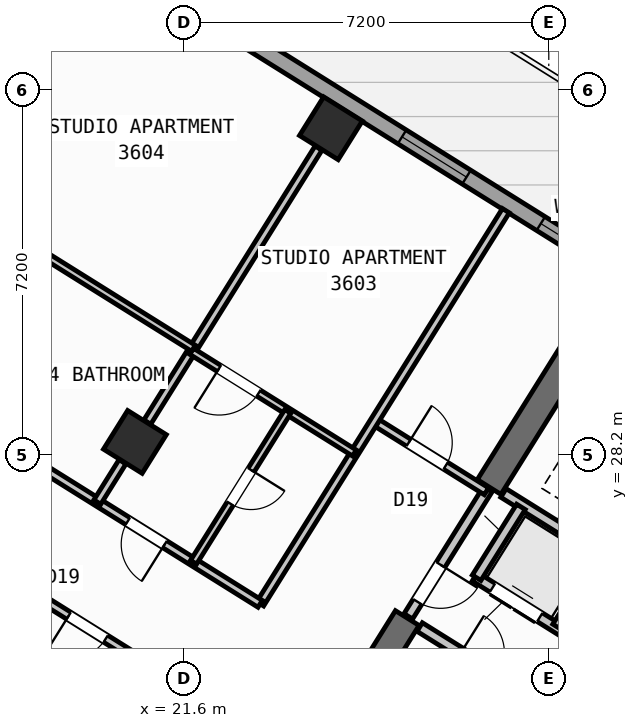
"""IFC4 building model, lengths in metres.
Left out: names, types, materials, properties, quantities, classifications, styles, units other than length and angle.
Written with IfcOpenShell. Run it as: python <this file> out.ifc"""

import sys

from ifc_helpers import new_model, si_unit, direction, frame, frame_2d, origin, origin_2d, place, context, subcontext, project, spatial, rectangle, hollow_rectangle, extrude, source, transform, mapped, element, fill, save


model = new_model("IFC4")
c1 = context("Model", 3, precision=1e-05, world=origin(), true_north=direction((0.0, 1.0)))
c2 = subcontext(c1, "Body", "Model", "MODEL_VIEW")
j1 = project(units=[si_unit("LENGTHUNIT", "METRE"), si_unit("PLANEANGLEUNIT", "RADIAN")], contexts=[c1])
p1 = place(None, origin())
s1 = spatial("IfcSite", under=j1, at=p1, CompositionType="ELEMENT")
p2 = place(p1, origin())
s2 = spatial("IfcBuilding", under=s1, at=p2, CompositionType="ELEMENT")
p3 = place(p2, frame((0.0, 0.0, 144.3)))
s3 = spatial("IfcBuildingStorey", under=s2, at=p3, CompositionType="ELEMENT", Elevation=144.3)
p4 = place(p3, frame((29.517, 30.594, 0.0), z_axis=(0.0, 0.0, 1.0), x_axis=(-0.529906864564, -0.848055844204, 0.0)))
e1 = element("IfcWall", 1, at=p4, inside=s3, PredefinedType="SHEAR", context=c2, shape_type="SweptSolid", body=[
    extrude(rectangle(XDim=3.575, YDim=0.55, at=frame_2d((1.788, 0.0))), origin(), (0.0, 0.0, 1.0), 3.35),
])
p5 = place(p3, frame((26.007, 24.976, 0.0), z_axis=(0.0, 0.0, 1.0), x_axis=(-0.529923795287, -0.848045264823, 0.0)))
e2 = element("IfcWall", 2, at=p5, inside=s3, PredefinedType="SHEAR", context=c2, shape_type="SweptSolid", body=[
    extrude(rectangle(XDim=6.425, YDim=0.55, at=frame_2d((3.212, 0.0))), origin(), (0.0, 0.0, 1.0), 3.35),
])
m1 = source(origin(), c2, "Body", "SweptSolid", [
    extrude(hollow_rectangle(XDim=0.9, YDim=0.9, WallThickness=0.036, at=origin_2d()), origin(), (0.0, 0.0, 1.0), 3.6),
])
for number, where, z_axis, x_axis in (
    (3, (24.5, 34.643, 0.0), (0.0, 0.0, 1.0), (-0.848, 0.53, 0.0)),
    (4, (20.632, 28.452, 0.0), (0.0, 0.0, 1.0), (-0.848, 0.53, 0.0)),
):
    element("IfcColumn", number, at=place(p3, frame(where, z_axis=z_axis, x_axis=x_axis)), inside=s3, PredefinedType="COLUMN", context=c2, shape_type="MappedRepresentation", body=[
        mapped(m1, transform((0.0, 0.0, 0.0), scale=1.0)),
    ])
p6 = place(p3, frame((14.138, 41.825, 0.0), z_axis=(0.0, 0.0, 1.0), x_axis=(0.848046498049, -0.529921821731, 0.0)))
e5 = element("IfcWall", 5, at=p6, inside=s3, PredefinedType="STANDARD", context=c2, shape_type="SweptSolid", body=[
    extrude(rectangle(XDim=31.588, YDim=0.32, at=frame_2d((15.794, 0.0))), origin(), (0.0, 0.0, 1.0), 3.35),
])
p7 = place(p6, frame((2.949, 0.0, 0.0)))
e6 = element("IfcOpeningElement", 6, at=p7, cuts=e5, PredefinedType="OPENING", context=c2, shape_type="SweptSolid", body=[
    extrude(rectangle(XDim=1.05, YDim=2.15, at=frame_2d((0.525, 1.075))), frame((0.0, 0.17, 0.0), z_axis=(0.0, -1.0, 0.0), x_axis=(1.0, 0.0, 0.0)), (0.0, 0.0, 1.0), 0.34),
])
p8 = place(p6, frame((0.861, 0.0, 0.85)))
e7 = element("IfcOpeningElement", 7, at=p8, cuts=e5, PredefinedType="OPENING", context=c2, shape_type="SweptSolid", body=[
    extrude(rectangle(XDim=1.5, YDim=1.5, at=frame_2d((0.75, 0.75))), frame((0.0, 0.17, 0.0), z_axis=(0.0, -1.0, 0.0), x_axis=(1.0, 0.0, 0.0)), (0.0, 0.0, 1.0), 0.34),
])
p9 = place(p6, frame((8.494, 0.0, 0.85)))
e8 = element("IfcOpeningElement", 8, at=p9, cuts=e5, PredefinedType="OPENING", context=c2, shape_type="SweptSolid", body=[
    extrude(rectangle(XDim=1.8, YDim=1.5, at=frame_2d((0.9, 0.75))), frame((0.0, 0.17, 0.0), z_axis=(0.0, -1.0, 0.0), x_axis=(1.0, 0.0, 0.0)), (0.0, 0.0, 1.0), 0.34),
])
p10 = place(p6, frame((13.874, 0.0, 0.85)))
e9 = element("IfcOpeningElement", 9, at=p10, cuts=e5, PredefinedType="OPENING", context=c2, shape_type="SweptSolid", body=[
    extrude(rectangle(XDim=1.5, YDim=1.5, at=frame_2d((0.75, 0.75))), frame((0.0, 0.17, 0.0), z_axis=(0.0, -1.0, 0.0), x_axis=(1.0, 0.0, 0.0)), (0.0, 0.0, 1.0), 0.34),
])
p11 = place(p6, frame((17.104, 0.0, 1.0)))
e10 = element("IfcOpeningElement", 10, at=p11, cuts=e5, PredefinedType="OPENING", context=c2, shape_type="SweptSolid", body=[
    extrude(rectangle(XDim=0.9, YDim=1.25, at=frame_2d((0.45, 0.625))), frame((0.0, 0.17, 0.0), z_axis=(0.0, -1.0, 0.0), x_axis=(1.0, 0.0, 0.0)), (0.0, 0.0, 1.0), 0.34),
])
p12 = place(p6, frame((22.144, 0.0, 1.0)))
e11 = element("IfcOpeningElement", 11, at=p12, cuts=e5, PredefinedType="OPENING", context=c2, shape_type="SweptSolid", body=[
    extrude(rectangle(XDim=0.9, YDim=1.25, at=frame_2d((0.45, 0.625))), frame((0.0, 0.17, 0.0), z_axis=(0.0, -1.0, 0.0), x_axis=(1.0, 0.0, 0.0)), (0.0, 0.0, 1.0), 0.34),
])
p13 = place(p6, frame((27.744, 0.0, 1.0)))
e12 = element("IfcOpeningElement", 12, at=p13, cuts=e5, PredefinedType="OPENING", context=c2, shape_type="SweptSolid", body=[
    extrude(rectangle(XDim=0.9, YDim=1.25, at=frame_2d((0.45, 0.625))), frame((0.0, 0.17, 0.0), z_axis=(0.0, -1.0, 0.0), x_axis=(1.0, 0.0, 0.0)), (0.0, 0.0, 1.0), 0.34),
])
p14 = place(p3, frame((31.822, 24.998, 0.0), z_axis=(0.0, 0.0, 1.0), x_axis=(-0.848036912365, 0.52993716162, 0.0)))
e13 = element("IfcWall", 13, at=p14, inside=s3, PredefinedType="STANDARD", context=c2, shape_type="SweptSolid", body=[
    extrude(rectangle(XDim=4.618, YDim=0.2, at=frame_2d((2.309, 0.0))), origin(), (0.0, 0.0, 1.0), 3.34),
])
p15 = place(p3, frame((32.108, 22.814, 0.0), z_axis=(0.0, 0.0, 1.0), x_axis=(-0.848042229521, 0.529928652696, 0.0)))
e14 = element("IfcWall", 14, at=p15, inside=s3, PredefinedType="STANDARD", context=c2, shape_type="SweptSolid", body=[
    extrude(rectangle(XDim=5.62, YDim=0.2, at=frame_2d((2.81, 0.0))), origin(), (0.0, 0.0, 1.0), 3.34),
])
p16 = place(p15, frame((0.39, 0.0, 0.0)))
e15 = element("IfcOpeningElement", 15, at=p16, cuts=e14, PredefinedType="OPENING", context=c2, shape_type="SweptSolid", body=[
    extrude(rectangle(XDim=1.1, YDim=2.15, at=frame_2d((0.55, 1.075))), frame((0.0, 0.11, 0.0), z_axis=(0.0, -1.0, 0.0), x_axis=(1.0, 0.0, 0.0)), (0.0, 0.0, 1.0), 0.22),
])
p17 = place(p15, frame((2.25, 0.0, 0.0)))
e16 = element("IfcOpeningElement", 16, at=p17, cuts=e14, PredefinedType="OPENING", context=c2, shape_type="SweptSolid", body=[
    extrude(rectangle(XDim=1.1, YDim=2.15, at=frame_2d((0.55, 1.075))), frame((0.0, 0.11, 0.0), z_axis=(0.0, -1.0, 0.0), x_axis=(1.0, 0.0, 0.0)), (0.0, 0.0, 1.0), 0.22),
])
p18 = place(p15, frame((4.11, 0.0, 0.0)))
e17 = element("IfcOpeningElement", 17, at=p18, cuts=e14, PredefinedType="OPENING", context=c2, shape_type="SweptSolid", body=[
    extrude(rectangle(XDim=1.1, YDim=2.15, at=frame_2d((0.55, 1.075))), frame((0.0, 0.11, 0.0), z_axis=(0.0, -1.0, 0.0), x_axis=(1.0, 0.0, 0.0)), (0.0, 0.0, 1.0), 0.22),
])
p19 = place(p3, frame((28.25, 27.17, 0.0), z_axis=(0.0, 0.0, 1.0), x_axis=(-0.529905827651, -0.848056492117, 0.0)))
e18 = element("IfcWall", 18, at=p19, inside=s3, PredefinedType="STANDARD", context=c2, shape_type="SweptSolid", body=[
    extrude(rectangle(XDim=1.65, YDim=0.2, at=frame_2d((0.825, 0.0))), origin(), (0.0, 0.0, 1.0), 3.34),
])
p20 = place(p3, frame((29.801, 26.142, 0.0), z_axis=(0.0, 0.0, 1.0), x_axis=(-0.529998940003, -0.847998304005, 0.0)))
e19 = element("IfcWall", 19, at=p20, inside=s3, PredefinedType="STANDARD", context=c2, shape_type="SweptSolid", body=[
    extrude(rectangle(XDim=1.58, YDim=0.2, at=frame_2d((0.79, 0.0))), origin(), (0.0, 0.0, 1.0), 3.34),
])
p21 = place(p3, frame((31.525, 21.504, 0.0), z_axis=(0.0, 0.0, 1.0), x_axis=(-0.848040211232, 0.529931882541, 0.0)))
e20 = element("IfcWall", 20, at=p21, inside=s3, PredefinedType="STANDARD", context=c2, shape_type="SweptSolid", body=[
    extrude(rectangle(XDim=6.218, YDim=0.2, at=frame_2d((3.109, 0.0))), origin(), (0.0, 0.0, 1.0), 3.34),
])
p22 = place(p21, frame((4.4, 0.0, 0.0)))
e21 = element("IfcOpeningElement", 21, at=p22, cuts=e20, PredefinedType="OPENING", context=c2, shape_type="SweptSolid", body=[
    extrude(rectangle(XDim=0.86, YDim=2.05, at=frame_2d((0.43, 1.025))), frame((0.0, 0.11, 0.0), z_axis=(0.0, -1.0, 0.0), x_axis=(1.0, 0.0, 0.0)), (0.0, 0.0, 1.0), 0.22),
])
p23 = place(p21, frame((1.45, 0.0, 0.0)))
e22 = element("IfcOpeningElement", 22, at=p23, cuts=e20, PredefinedType="OPENING", context=c2, shape_type="SweptSolid", body=[
    extrude(rectangle(XDim=0.86, YDim=2.05, at=frame_2d((0.43, 1.025))), frame((0.0, 0.11, 0.0), z_axis=(0.0, -1.0, 0.0), x_axis=(1.0, 0.0, 0.0)), (0.0, 0.0, 1.0), 0.22),
])
p24 = place(p3, frame((27.596, 27.52, 0.0), z_axis=(0.0, 0.0, 1.0), x_axis=(-0.529865479138, -0.848081702443, 0.0)))
e23 = element("IfcWall", 23, at=p24, inside=s3, PredefinedType="STANDARD", context=c2, shape_type="SweptSolid", body=[
    extrude(rectangle(XDim=2.96, YDim=0.2, at=frame_2d((1.48, 0.0))), origin(), (0.0, 0.0, 1.0), 3.34),
])
p25 = place(p24, frame((1.76, 0.0, 0.0)))
e24 = element("IfcOpeningElement", 24, at=p25, cuts=e23, PredefinedType="OPENING", context=c2, shape_type="SweptSolid", body=[
    extrude(rectangle(XDim=0.86, YDim=2.05, at=frame_2d((0.43, 1.025))), frame((0.0, 0.11, 0.0), z_axis=(0.0, -1.0, 0.0), x_axis=(1.0, 0.0, 0.0)), (0.0, 0.0, 1.0), 0.22),
])
p26 = place(p3, frame((27.57, 27.478, 0.0), z_axis=(0.0, 0.0, 1.0), x_axis=(-0.848050851465, 0.529914854792, 0.0)))
e25 = element("IfcWall", 25, at=p26, inside=s3, PredefinedType="PARTITIONING", context=c2, shape_type="SweptSolid", body=[
    extrude(rectangle(XDim=2.61, YDim=0.16, at=frame_2d((1.305, 0.0))), origin(), (0.0, 0.0, 1.0), 3.34),
])
p27 = place(p26, frame((0.95, 0.0, 0.0)))
e26 = element("IfcOpeningElement", 26, at=p27, cuts=e25, PredefinedType="OPENING", context=c2, shape_type="SweptSolid", body=[
    extrude(rectangle(XDim=0.86, YDim=2.05, at=frame_2d((0.43, 1.025))), frame((0.0, 0.09, 0.0), z_axis=(0.0, -1.0, 0.0), x_axis=(1.0, 0.0, 0.0)), (0.0, 0.0, 1.0), 0.18),
])
p28 = place(p3, frame((27.953, 33.016, 0.0), z_axis=(0.0, 0.0, 1.0), x_axis=(-0.529903001606, -0.848058257957, 0.0)))
e27 = element("IfcWall", 27, at=p28, inside=s3, PredefinedType="PARTITIONING", context=c2, shape_type="SweptSolid", body=[
    extrude(rectangle(XDim=9.15, YDim=0.16, at=frame_2d((4.575, 0.0))), origin(), (0.0, 0.0, 1.0), 3.34),
])
p29 = place(p3, frame((23.104, 25.256, 0.0), z_axis=(0.0, 0.0, 1.0), x_axis=(-0.848041752158, 0.529929416617, 0.0)))
e28 = element("IfcWall", 28, at=p29, inside=s3, PredefinedType="PARTITIONING", context=c2, shape_type="SweptSolid", body=[
    extrude(rectangle(XDim=16.73, YDim=0.16, at=frame_2d((8.365, 0.0))), origin(), (0.0, 0.0, 1.0), 3.34),
])
p30 = place(p29, frame((2.22, 0.0, 0.0)))
e29 = element("IfcOpeningElement", 29, at=p30, cuts=e28, PredefinedType="OPENING", context=c2, shape_type="SweptSolid", body=[
    extrude(rectangle(XDim=0.86, YDim=2.05, at=frame_2d((0.43, 1.025))), frame((0.0, 0.09, 0.0), z_axis=(0.0, -1.0, 0.0), x_axis=(1.0, 0.0, 0.0)), (0.0, 0.0, 1.0), 0.18),
])
p31 = place(p29, frame((12.084, 0.0, 0.0)))
e30 = element("IfcOpeningElement", 30, at=p31, cuts=e28, PredefinedType="OPENING", context=c2, shape_type="SweptSolid", body=[
    extrude(rectangle(XDim=1.0, YDim=2.1, at=frame_2d((0.5, 1.05))), frame((0.0, 0.09, 0.0), z_axis=(0.0, -1.0, 0.0), x_axis=(1.0, 0.0, 0.0)), (0.0, 0.0, 1.0), 0.18),
])
p32 = place(p3, frame((21.938, 23.391, 0.0), z_axis=(0.0, 0.0, 1.0), x_axis=(-0.848045850158, 0.529922858565, 0.0)))
e31 = element("IfcWall", 31, at=p32, inside=s3, PredefinedType="PARTITIONING", context=c2, shape_type="SweptSolid", body=[
    extrude(rectangle(XDim=16.73, YDim=0.16, at=frame_2d((8.365, 0.0))), origin(), (0.0, 0.0, 1.0), 3.34),
])
p33 = place(p32, frame((2.22, 0.0, 0.0)))
e32 = element("IfcOpeningElement", 32, at=p33, cuts=e31, PredefinedType="OPENING", context=c2, shape_type="SweptSolid", body=[
    extrude(rectangle(XDim=0.86, YDim=2.05, at=frame_2d((0.43, 1.025))), frame((0.0, 0.09, 0.0), z_axis=(0.0, -1.0, 0.0), x_axis=(1.0, 0.0, 0.0)), (0.0, 0.0, 1.0), 0.18),
])
p34 = place(p32, frame((14.22, 0.0, 0.0)))
e33 = element("IfcOpeningElement", 33, at=p34, cuts=e31, PredefinedType="OPENING", context=c2, shape_type="SweptSolid", body=[
    extrude(rectangle(XDim=1.0, YDim=2.1, at=frame_2d((0.5, 1.05))), frame((0.0, 0.09, 0.0), z_axis=(0.0, -1.0, 0.0), x_axis=(1.0, 0.0, 0.0)), (0.0, 0.0, 1.0), 0.18),
])
p35 = place(p3, frame((24.256, 34.251, 0.0), z_axis=(0.0, 0.0, 1.0), x_axis=(-0.529919772691, -0.848047778437, 0.0)))
e34 = element("IfcWall", 34, at=p35, inside=s3, PredefinedType="PARTITIONING", context=c2, shape_type="SweptSolid", body=[
    extrude(rectangle(XDim=6.376, YDim=0.16, at=frame_2d((3.188, 0.0))), origin(), (0.0, 0.0, 1.0), 2.775),
])
p36 = place(p3, frame((20.387, 28.06, 0.0), z_axis=(0.0, 0.0, 1.0), x_axis=(-0.529952145338, -0.848027548876, 0.0)))
e35 = element("IfcWall", 35, at=p36, inside=s3, PredefinedType="PARTITIONING", context=c2, shape_type="SweptSolid", body=[
    extrude(rectangle(XDim=0.938, YDim=0.16, at=frame_2d((0.469, 0.0))), origin(), (0.0, 0.0, 1.0), 2.775),
])
p37 = place(p3, frame((24.964, 28.233, 0.0), z_axis=(0.0, 0.0, 1.0), x_axis=(-0.848059820872, 0.529900500304, 0.0)))
e36 = element("IfcWall", 36, at=p37, inside=s3, PredefinedType="PLUMBINGWALL", context=c2, shape_type="SweptSolid", body=[
    extrude(rectangle(XDim=3.79, YDim=0.14, at=frame_2d((1.895, 0.0))), origin(), (0.0, 0.0, 1.0), 3.34),
])
p38 = place(p37, frame((2.23, 0.0, 0.0)))
e37 = element("IfcOpeningElement", 37, at=p38, cuts=e36, PredefinedType="OPENING", context=c2, shape_type="SweptSolid", body=[
    extrude(rectangle(XDim=0.92, YDim=2.08, at=frame_2d((0.46, 1.04))), frame((0.0, 0.08, 0.0), z_axis=(0.0, -1.0, 0.0), x_axis=(1.0, 0.0, 0.0)), (0.0, 0.0, 1.0), 0.16),
])
p39 = place(p3, frame((23.65, 29.054, 0.0), z_axis=(0.0, 0.0, 1.0), x_axis=(-0.529898896701, -0.848060822863, 0.0)))
e38 = element("IfcWall", 38, at=p39, inside=s3, PredefinedType="PLUMBINGWALL", context=c2, shape_type="SweptSolid", body=[
    extrude(rectangle(XDim=3.51, YDim=0.14, at=frame_2d((1.755, 0.0))), origin(), (0.0, 0.0, 1.0), 2.995),
])
p40 = place(p39, frame((1.365, 0.0, 0.0)))
e39 = element("IfcOpeningElement", 39, at=p40, cuts=e38, PredefinedType="OPENING", context=c2, shape_type="SweptSolid", body=[
    extrude(rectangle(XDim=0.78, YDim=2.05, at=frame_2d((0.39, 1.025))), frame((0.0, 0.08, 0.0), z_axis=(0.0, -1.0, 0.0), x_axis=(1.0, 0.0, 0.0)), (0.0, 0.0, 1.0), 0.16),
])
p41 = place(p3, frame((21.787, 30.301, 0.0), z_axis=(0.0, 0.0, 1.0), x_axis=(-0.848043949058, 0.52992590092, 0.0)))
e40 = element("IfcWall", 40, at=p41, inside=s3, PredefinedType="PLUMBINGWALL", context=c2, shape_type="SweptSolid", body=[
    extrude(rectangle(XDim=12.92, YDim=0.14, at=frame_2d((6.46, 0.0))), origin(), (0.0, 0.0, 1.0), 3.34),
])
p42 = place(p41, frame((5.849, 0.0, 0.0)))
e41 = element("IfcOpeningElement", 41, at=p42, cuts=e40, PredefinedType="OPENING", context=c2, shape_type="SweptSolid", body=[
    extrude(rectangle(XDim=0.92, YDim=2.08, at=frame_2d((0.46, 1.04))), frame((0.0, 0.08, 0.0), z_axis=(0.0, -1.0, 0.0), x_axis=(1.0, 0.0, 0.0)), (0.0, 0.0, 1.0), 0.16),
])
m2 = source(origin(), c2, "Body", "SweptSolid", [
    extrude(rectangle(XDim=1.5, YDim=1.5, at=frame_2d((0.75, 0.75))), frame((0.0, 0.03, 0.0), z_axis=(0.0, -1.0, 0.0), x_axis=(1.0, 0.0, 0.0)), (0.0, 0.0, 1.0), 0.06),
])
p43 = place(p10, origin())
e42 = element("IfcWindow", 42, at=p43, inside=s3, PartitioningType="SINGLE_PANEL", PredefinedType="WINDOW", context=c2, shape_type="MappedRepresentation", body=[
    mapped(m2, transform((0.0, 0.0, 0.0), scale=1.0)),
])
fill(e9, e42)
m3 = source(origin(), c2, "Body", "SweptSolid", [
    extrude(rectangle(XDim=0.9, YDim=1.25, at=frame_2d((0.45, 0.625))), frame((0.0, 0.03, 0.0), z_axis=(0.0, -1.0, 0.0), x_axis=(1.0, 0.0, 0.0)), (0.0, 0.0, 1.0), 0.06),
])
p44 = place(p11, origin())
e43 = element("IfcWindow", 43, at=p44, inside=s3, PartitioningType="SINGLE_PANEL", PredefinedType="WINDOW", context=c2, shape_type="MappedRepresentation", body=[
    mapped(m3, transform((0.0, 0.0, 0.0), scale=1.0)),
])
fill(e10, e43)
m4 = source(origin(), c2, "Body", "SweptSolid", [
    extrude(rectangle(XDim=1.1, YDim=2.15, at=frame_2d((0.55, 1.075))), frame((0.0, 0.025, 0.0), z_axis=(0.0, -1.0, 0.0), x_axis=(1.0, 0.0, 0.0)), (0.0, 0.0, 1.0), 0.05),
])
p45 = place(p18, origin())
e44 = element("IfcDoor", 44, at=p45, inside=s3, OperationType="DOUBLE_DOOR_SLIDING", PredefinedType="DOOR", context=c2, shape_type="MappedRepresentation", body=[
    mapped(m4, transform((0.0, 0.0, 0.0), scale=1.0)),
])
fill(e17, e44)
m5 = source(origin(), c2, "Body", "SweptSolid", [
    extrude(rectangle(XDim=0.86, YDim=2.05, at=frame_2d((0.43, 1.025))), frame((0.0, 0.025, 0.0), z_axis=(0.0, -1.0, 0.0), x_axis=(1.0, 0.0, 0.0)), (0.0, 0.0, 1.0), 0.05),
])
p46 = place(p27, frame((0.86, 0.0, 0.0), z_axis=(0.0, 0.0, 1.0), x_axis=(-1.0, 0.0, 0.0)))
e45 = element("IfcDoor", 45, at=p46, inside=s3, OperationType="SINGLE_SWING_LEFT", PredefinedType="DOOR", context=c2, shape_type="MappedRepresentation", body=[
    mapped(m5, transform((0.0, 0.0, 0.0), scale=1.0)),
])
fill(e26, e45)
p47 = place(p25, origin())
e46 = element("IfcDoor", 46, at=p47, inside=s3, OperationType="SINGLE_SWING_LEFT", PredefinedType="DOOR", context=c2, shape_type="MappedRepresentation", body=[
    mapped(m5, transform((0.0, 0.0, 0.0), scale=1.0)),
])
fill(e24, e46)
p48 = place(p33, origin())
e47 = element("IfcDoor", 47, at=p48, inside=s3, OperationType="SINGLE_SWING_RIGHT", PredefinedType="DOOR", context=c2, shape_type="MappedRepresentation", body=[
    mapped(m5, transform((0.0, 0.0, 0.0), scale=1.0)),
])
fill(e32, e47)
p49 = place(p30, origin())
e48 = element("IfcDoor", 48, at=p49, inside=s3, OperationType="SINGLE_SWING_LEFT", PredefinedType="DOOR", context=c2, shape_type="MappedRepresentation", body=[
    mapped(m5, transform((0.0, 0.0, 0.0), scale=1.0)),
])
fill(e29, e48)
m6 = source(origin(), c2, "Body", "SweptSolid", [
    extrude(rectangle(XDim=0.92, YDim=2.08, at=frame_2d((0.46, 1.04))), frame((0.0, 0.025, 0.0), z_axis=(0.0, -1.0, 0.0), x_axis=(1.0, 0.0, 0.0)), (0.0, 0.0, 1.0), 0.05),
])
p50 = place(p38, origin())
e49 = element("IfcDoor", 49, at=p50, inside=s3, OperationType="SINGLE_SWING_RIGHT", PredefinedType="DOOR", context=c2, shape_type="MappedRepresentation", body=[
    mapped(m6, transform((0.0, 0.0, 0.0), scale=1.0)),
])
fill(e37, e49)
m7 = source(origin(), c2, "Body", "SweptSolid", [
    extrude(rectangle(XDim=0.78, YDim=2.05, at=frame_2d((0.39, 1.025))), frame((0.0, 0.025, 0.0), z_axis=(0.0, -1.0, 0.0), x_axis=(1.0, 0.0, 0.0)), (0.0, 0.0, 1.0), 0.05),
])
p51 = place(p40, origin())
e50 = element("IfcDoor", 50, at=p51, inside=s3, OperationType="SINGLE_SWING_LEFT", PredefinedType="DOOR", context=c2, shape_type="MappedRepresentation", body=[
    mapped(m7, transform((0.0, 0.0, 0.0), scale=1.0)),
])
fill(e39, e50)
save(model, sys.argv[1])
